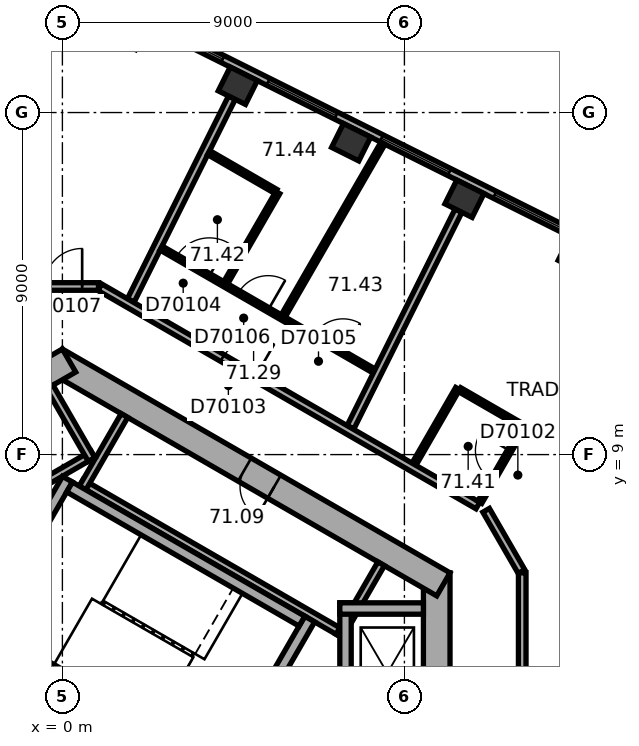
"""IFC4 building model, lengths in metres.
Left out: names, types, materials, properties, quantities, classifications, styles, units other than length and angle.
Written with IfcOpenShell. Run it as: python <this file> out.ifc"""

import sys

from ifc_helpers import new_model, si_unit, direction, frame, frame_2d, origin, origin_2d, place, context, subcontext, project, spatial, rectangle, extrude, element, fill, save


model = new_model("IFC4")
c1 = context("Model", 3, precision=1e-05, world=origin(), true_north=direction((0.0, 1.0)))
c2 = subcontext(c1, "Body", "Model", "MODEL_VIEW")
j1 = project(units=[si_unit("LENGTHUNIT", "METRE"), si_unit("PLANEANGLEUNIT", "RADIAN")], contexts=[c1])
p1 = place(None, origin())
s1 = spatial("IfcSite", under=j1, at=p1, CompositionType="ELEMENT")
p2 = place(p1, origin())
s2 = spatial("IfcBuilding", under=s1, at=p2, CompositionType="ELEMENT")
p3 = place(p2, frame((0.0, 0.0, 289.4)))
s3 = spatial("IfcBuildingStorey", under=s2, at=p3, CompositionType="ELEMENT", Elevation=289.4)
for number, where, z_axis, x_axis in (
    (1, (13.561, 14.246, 0.0), (0.0, 0.0, 1.0), (-0.895, 0.446, 0.0)),
    (2, (10.58, 15.732, 0.0), (0.0, 0.0, 1.0), (-0.895, 0.446, 0.0)),
    (3, (7.598, 17.219, 0.0), (0.0, 0.0, 1.0), (-0.895, 0.446, 0.0)),
    (4, (4.616, 18.706, 0.0), (0.0, 0.0, 1.0), (-0.895, 0.446, 0.0)),
):
    element("IfcColumn", number, at=place(p3, frame(where, z_axis=z_axis, x_axis=x_axis)), inside=s3, PredefinedType="COLUMN", context=c2, shape_type="SweptSolid", body=[
        extrude(rectangle(XDim=0.8, YDim=0.7, at=origin_2d()), origin(), (0.0, 0.0, 1.0), 3.7),
    ])
p4 = place(p3, frame((9.85, -5.889, 0.0), z_axis=(0.0, 0.0, 1.0), x_axis=(0.0, 1.0, 0.0)))
e5 = element("IfcWall", 5, at=p4, inside=s3, PredefinedType="SHEAR", context=c2, shape_type="SweptSolid", body=[
    extrude(rectangle(XDim=11.778, YDim=0.7, at=frame_2d((5.889, 0.0))), origin(), (0.0, 0.0, 1.0), 3.7),
])
p5 = place(p4, frame((6.089, 0.0, 0.0)))
e6 = element("IfcOpeningElement", 6, at=p5, cuts=e5, PredefinedType="OPENING", context=c2, shape_type="SweptSolid", body=[
    extrude(rectangle(XDim=1.5, YDim=2.1, at=frame_2d((0.75, 1.05))), frame((0.0, 0.36, 0.0), z_axis=(0.0, -1.0, 0.0), x_axis=(1.0, 0.0, 0.0)), (0.0, 0.0, 1.0), 0.72),
])
p6 = place(p4, frame((2.939, 0.0, 0.0)))
e7 = element("IfcOpeningElement", 7, at=p6, cuts=e5, PredefinedType="OPENING", context=c2, shape_type="SweptSolid", body=[
    extrude(rectangle(XDim=0.9, YDim=2.1, at=frame_2d((0.45, 1.05))), frame((0.0, 0.36, 0.0), z_axis=(0.0, -1.0, 0.0), x_axis=(1.0, 0.0, 0.0)), (0.0, 0.0, 1.0), 0.72),
])
p7 = place(p3, frame((10.025, 5.586, 0.0), z_axis=(0.0, 0.0, 1.0), x_axis=(-0.866026453023, 0.499998182661, 0.0)))
e8 = element("IfcWall", 8, at=p7, inside=s3, PredefinedType="SHEAR", context=c2, shape_type="SweptSolid", body=[
    extrude(rectangle(XDim=11.778, YDim=0.7, at=frame_2d((5.889, 0.0))), origin(), (0.0, 0.0, 1.0), 3.7),
])
p8 = place(p7, frame((5.139, 0.0, 0.0)))
e9 = element("IfcOpeningElement", 9, at=p8, cuts=e8, PredefinedType="OPENING", context=c2, shape_type="SweptSolid", body=[
    extrude(rectangle(XDim=0.9, YDim=2.1, at=frame_2d((0.45, 1.05))), frame((0.0, 0.36, 0.0), z_axis=(0.0, -1.0, 0.0), x_axis=(1.0, 0.0, 0.0)), (0.0, 0.0, 1.0), 0.72),
])
p9 = place(p3, frame((0.175, 11.475, 0.0), z_axis=(0.0, 0.0, 1.0), x_axis=(-0.866026453023, -0.499998182661, 0.0)))
e10 = element("IfcWall", 10, at=p9, inside=s3, PredefinedType="SHEAR", context=c2, shape_type="SweptSolid", body=[
    extrude(rectangle(XDim=11.778, YDim=0.7, at=frame_2d((5.889, 0.0))), origin(), (0.0, 0.0, 1.0), 3.7),
])
p10 = place(p9, frame((6.089, 0.0, 0.0)))
e11 = element("IfcOpeningElement", 11, at=p10, cuts=e10, PredefinedType="OPENING", context=c2, shape_type="SweptSolid", body=[
    extrude(rectangle(XDim=1.5, YDim=2.1, at=frame_2d((0.75, 1.05))), frame((0.0, 0.36, 0.0), z_axis=(0.0, -1.0, 0.0), x_axis=(1.0, 0.0, 0.0)), (0.0, 0.0, 1.0), 0.72),
])
p11 = place(p9, frame((2.939, 0.0, 0.0)))
e12 = element("IfcOpeningElement", 12, at=p11, cuts=e10, PredefinedType="OPENING", context=c2, shape_type="SweptSolid", body=[
    extrude(rectangle(XDim=0.9, YDim=2.1, at=frame_2d((0.45, 1.05))), frame((0.0, 0.36, 0.0), z_axis=(0.0, -1.0, 0.0), x_axis=(1.0, 0.0, 0.0)), (0.0, 0.0, 1.0), 0.72),
])
p12 = place(p3, frame((17.223, 12.923, 0.0), z_axis=(0.0, 0.0, 1.0), x_axis=(-0.894930561148, 0.44620543556, 0.0)))
e13 = element("IfcWall", 13, at=p12, inside=s3, PredefinedType="STANDARD", context=c2, shape_type="SweptSolid", body=[
    extrude(rectangle(XDim=17.731, YDim=0.2, at=frame_2d((8.866, 0.0))), origin(), (0.0, 0.0, 1.0), 3.7),
])
p13 = place(p12, frame((1.202, 0.0, 0.9)))
e14 = element("IfcOpeningElement", 14, at=p13, cuts=e13, PredefinedType="OPENING", context=c2, shape_type="SweptSolid", body=[
    extrude(rectangle(XDim=2.0, YDim=2.0, at=frame_2d((1.0, 1.0))), frame((0.0, 0.11, 0.0), z_axis=(0.0, -1.0, 0.0), x_axis=(1.0, 0.0, 0.0)), (0.0, 0.0, 1.0), 0.22),
])
p14 = place(p12, frame((4.533, 0.0, 0.9)))
e15 = element("IfcOpeningElement", 15, at=p14, cuts=e13, PredefinedType="OPENING", context=c2, shape_type="SweptSolid", body=[
    extrude(rectangle(XDim=2.0, YDim=2.0, at=frame_2d((1.0, 1.0))), frame((0.0, 0.11, 0.0), z_axis=(0.0, -1.0, 0.0), x_axis=(1.0, 0.0, 0.0)), (0.0, 0.0, 1.0), 0.22),
])
p15 = place(p12, frame((7.865, 0.0, 0.9)))
e16 = element("IfcOpeningElement", 16, at=p15, cuts=e13, PredefinedType="OPENING", context=c2, shape_type="SweptSolid", body=[
    extrude(rectangle(XDim=2.0, YDim=2.0, at=frame_2d((1.0, 1.0))), frame((0.0, 0.11, 0.0), z_axis=(0.0, -1.0, 0.0), x_axis=(1.0, 0.0, 0.0)), (0.0, 0.0, 1.0), 0.22),
])
p16 = place(p12, frame((11.197, 0.0, 0.9)))
e17 = element("IfcOpeningElement", 17, at=p16, cuts=e13, PredefinedType="OPENING", context=c2, shape_type="SweptSolid", body=[
    extrude(rectangle(XDim=2.0, YDim=2.0, at=frame_2d((1.0, 1.0))), frame((0.0, 0.11, 0.0), z_axis=(0.0, -1.0, 0.0), x_axis=(1.0, 0.0, 0.0)), (0.0, 0.0, 1.0), 0.22),
])
p17 = place(p12, frame((14.528, 0.0, 0.9)))
e18 = element("IfcOpeningElement", 18, at=p17, cuts=e13, PredefinedType="OPENING", context=c2, shape_type="SweptSolid", body=[
    extrude(rectangle(XDim=2.0, YDim=2.0, at=frame_2d((1.0, 1.0))), frame((0.0, 0.11, 0.0), z_axis=(0.0, -1.0, 0.0), x_axis=(1.0, 0.0, 0.0)), (0.0, 0.0, 1.0), 0.22),
])
p18 = place(p3, frame((7.424, 4.259, 0.0), z_axis=(0.0, 0.0, 1.0), x_axis=(-0.866026010844, 0.49999894854, 0.0)))
e19 = element("IfcWall", 19, at=p18, inside=s3, PredefinedType="PARTITIONING", context=c2, shape_type="SweptSolid", body=[
    extrude(rectangle(XDim=8.0, YDim=0.2, at=frame_2d((4.0, 0.0))), origin(), (0.0, 0.0, 1.0), 3.42),
])
for number, where, z_axis, x_axis in (
    (20, (7.287, 4.222, 0.0), (0.0, 0.0, 1.0), (0.5, 0.866, 0.0)),
    (21, (0.532, 8.122, 0.0), (0.0, 0.0, 1.0), (0.5, 0.866, 0.0)),
):
    element("IfcWall", number, at=place(p3, frame(where, z_axis=z_axis, x_axis=x_axis)), inside=s3, PredefinedType="PARTITIONING", context=c2, shape_type="SweptSolid", body=[
        extrude(rectangle(XDim=2.2, YDim=0.2, at=frame_2d((1.1, 0.0))), origin(), (0.0, 0.0, 1.0), 3.42),
    ])
p19 = place(p3, frame((0.803, 9.009, 0.0), z_axis=(0.0, 0.0, 1.0), x_axis=(-0.866028230842, -0.499995103361, 0.0)))
e22 = element("IfcWall", 22, at=p19, inside=s3, PredefinedType="PARTITIONING", context=c2, shape_type="SweptSolid", body=[
    extrude(rectangle(XDim=5.4, YDim=0.2, at=frame_2d((2.7, 0.0))), origin(), (0.0, 0.0, 1.0), 3.42),
])
p20 = place(p3, frame((0.767, 8.872, 0.0), z_axis=(0.0, 0.0, 1.0), x_axis=(-0.499994660107, 0.866028486751, 0.0)))
e23 = element("IfcWall", 23, at=p20, inside=s3, PredefinedType="PARTITIONING", context=c2, shape_type="SweptSolid", body=[
    extrude(rectangle(XDim=2.2, YDim=0.2, at=frame_2d((1.1, 0.0))), origin(), (0.0, 0.0, 1.0), 3.42),
])
p21 = place(p3, frame((4.158, 0.602, 0.0), z_axis=(0.0, 0.0, 1.0), x_axis=(0.499977259774, 0.866038532462, 0.0)))
e24 = element("IfcWall", 24, at=p21, inside=s3, PredefinedType="SHEAR", context=c2, shape_type="SweptSolid", body=[
    extrude(rectangle(XDim=4.7, YDim=0.3, at=frame_2d((2.35, 0.0))), origin(), (0.0, 0.0, 1.0), 3.42),
])
p22 = place(p21, frame((0.8, 0.0, 0.0)))
e25 = element("IfcOpeningElement", 25, at=p22, cuts=e24, PredefinedType="OPENING", context=c2, shape_type="SweptSolid", body=[
    extrude(rectangle(XDim=1.2, YDim=2.1, at=frame_2d((0.6, 1.05))), frame((0.0, 0.16, 0.0), z_axis=(0.0, -1.0, 0.0), x_axis=(1.0, 0.0, 0.0)), (0.0, 0.0, 1.0), 0.32),
])
p23 = place(p3, frame((-2.216, 4.282, 0.0), z_axis=(0.0, 0.0, 1.0), x_axis=(0.499977259774, 0.866038532462, 0.0)))
e26 = element("IfcWall", 26, at=p23, inside=s3, PredefinedType="SHEAR", context=c2, shape_type="SweptSolid", body=[
    extrude(rectangle(XDim=4.7, YDim=0.3, at=frame_2d((2.35, 0.0))), origin(), (0.0, 0.0, 1.0), 3.42),
])
for number, where, z_axis, x_axis in (
    (27, (4.103, 0.807, 0.0), (0.0, 0.0, 1.0), (-0.866, 0.5, 0.0)),
    (28, (6.303, 4.617, 0.0), (0.0, 0.0, 1.0), (-0.866, 0.5, 0.0)),
):
    element("IfcWall", number, at=place(p3, frame(where, z_axis=z_axis, x_axis=x_axis)), inside=s3, PredefinedType="SHEAR", context=c2, shape_type="SweptSolid", body=[
        extrude(rectangle(XDim=7.06, YDim=0.3, at=frame_2d((3.53, 0.0))), origin(), (0.0, 0.0, 1.0), 3.42),
    ])
p24 = place(p3, frame((7.45, 1.75, 0.0), z_axis=(0.0, 0.0, 1.0), x_axis=(0.0, 1.0, 0.0)))
e29 = element("IfcWall", 29, at=p24, inside=s3, PredefinedType="SHEAR", context=c2, shape_type="SweptSolid", body=[
    extrude(rectangle(XDim=3.35, YDim=0.3, at=frame_2d((1.675, 0.0))), origin(), (0.0, 0.0, 1.0), 3.42),
])
p25 = place(p3, frame((7.3, 4.95, 0.0), z_axis=(0.0, 0.0, 1.0), x_axis=(1.0, 0.0, 0.0)))
e30 = element("IfcWall", 30, at=p25, inside=s3, PredefinedType="SHEAR", context=c2, shape_type="SweptSolid", body=[
    extrude(rectangle(XDim=2.2, YDim=0.3, at=frame_2d((1.1, 0.0))), origin(), (0.0, 0.0, 1.0), 3.42),
])
p26 = place(p3, frame((0.95, 13.423, 0.0), z_axis=(0.0, 0.0, 1.0), x_axis=(-1.0, 0.0, 0.0)))
e31 = element("IfcWall", 31, at=p26, inside=s3, PredefinedType="PARTITIONING", context=c2, shape_type="SweptSolid", body=[
    extrude(rectangle(XDim=1.86, YDim=0.2, at=frame_2d((0.93, 0.0))), origin(), (0.0, 0.0, 1.0), 3.42),
])
p27 = place(p26, frame((0.43, 0.0, 0.0)))
e32 = element("IfcOpeningElement", 32, at=p27, cuts=e31, PredefinedType="OPENING", context=c2, shape_type="SweptSolid", body=[
    extrude(rectangle(XDim=1.0, YDim=2.1, at=frame_2d((0.5, 1.05))), frame((0.0, 0.11, 0.0), z_axis=(0.0, -1.0, 0.0), x_axis=(1.0, 0.0, 0.0)), (0.0, 0.0, 1.0), 0.22),
])
p28 = place(p3, frame((4.299, 13.522, 0.0), z_axis=(0.0, 0.0, 1.0), x_axis=(0.499982138324, 0.866035715982, 0.0)))
e33 = element("IfcWall", 33, at=p28, inside=s3, PredefinedType="PARTITIONING", context=c2, shape_type="SweptSolid", body=[
    extrude(rectangle(XDim=2.74, YDim=0.12, at=frame_2d((1.37, 0.0))), origin(), (0.0, 0.0, 1.0), 3.42),
])
p29 = place(p3, frame((4.46, 18.392, 0.0), z_axis=(0.0, 0.0, 1.0), x_axis=(-0.446197360024, -0.894934587502, 0.0)))
e34 = element("IfcWall", 34, at=p29, inside=s3, PredefinedType="PARTITIONING", context=c2, shape_type="SweptSolid", body=[
    extrude(rectangle(XDim=5.96, YDim=0.2, at=frame_2d((2.98, 0.0))), origin(), (0.0, 0.0, 1.0), 2.87),
])
p30 = place(p3, frame((5.617, 15.925, 0.0), z_axis=(0.0, 0.0, 1.0), x_axis=(-0.866010195725, 0.500026340207, 0.0)))
e35 = element("IfcWall", 35, at=p30, inside=s3, PredefinedType="PARTITIONING", context=c2, shape_type="SweptSolid", body=[
    extrude(rectangle(XDim=2.04, YDim=0.12, at=frame_2d((1.02, 0.0))), origin(), (0.0, 0.0, 1.0), 3.42),
])
p31 = place(p3, frame((8.207, 11.197, 0.0), z_axis=(0.0, 0.0, 1.0), x_axis=(-0.866030514021, 0.499991148707, 0.0)))
e36 = element("IfcWall", 36, at=p31, inside=s3, PredefinedType="PARTITIONING", context=c2, shape_type="SweptSolid", body=[
    extrude(rectangle(XDim=6.476, YDim=0.12, at=frame_2d((3.238, 0.0))), origin(), (0.0, 0.0, 1.0), 3.42),
])
p32 = place(p31, frame((5.011, 0.0, 0.0)))
e37 = element("IfcOpeningElement", 37, at=p32, cuts=e36, PredefinedType="OPENING", context=c2, shape_type="SweptSolid", body=[
    extrude(rectangle(XDim=1.0, YDim=2.1, at=frame_2d((0.5, 1.05))), frame((0.0, 0.07, 0.0), z_axis=(0.0, -1.0, 0.0), x_axis=(1.0, 0.0, 0.0)), (0.0, 0.0, 1.0), 0.14),
])
p33 = place(p31, frame((0.95, 0.0, 0.0)))
e38 = element("IfcOpeningElement", 38, at=p33, cuts=e36, PredefinedType="OPENING", context=c2, shape_type="SweptSolid", body=[
    extrude(rectangle(XDim=0.9, YDim=2.1, at=frame_2d((0.45, 1.05))), frame((0.0, 0.07, 0.0), z_axis=(0.0, -1.0, 0.0), x_axis=(1.0, 0.0, 0.0)), (0.0, 0.0, 1.0), 0.14),
])
p34 = place(p31, frame((3.223, 0.0, 0.0)))
e39 = element("IfcOpeningElement", 39, at=p34, cuts=e36, PredefinedType="OPENING", context=c2, shape_type="SweptSolid", body=[
    extrude(rectangle(XDim=0.9, YDim=2.1, at=frame_2d((0.45, 1.05))), frame((0.0, 0.07, 0.0), z_axis=(0.0, -1.0, 0.0), x_axis=(1.0, 0.0, 0.0)), (0.0, 0.0, 1.0), 0.14),
])
p35 = place(p3, frame((8.435, 17.192, 0.0), z_axis=(0.0, 0.0, 1.0), x_axis=(-0.499982949935, -0.86603524742, 0.0)))
e40 = element("IfcWall", 40, at=p35, inside=s3, PredefinedType="PARTITIONING", context=c2, shape_type="SweptSolid", body=[
    extrude(rectangle(XDim=5.246, YDim=0.12, at=frame_2d((2.623, 0.0))), origin(), (0.0, 0.0, 1.0), 3.42),
])
p36 = place(p3, frame((9.251, 8.746, 0.0), z_axis=(0.0, 0.0, 1.0), x_axis=(0.499998129301, 0.86602648383, 0.0)))
e41 = element("IfcWall", 41, at=p36, inside=s3, PredefinedType="PARTITIONING", context=c2, shape_type="SweptSolid", body=[
    extrude(rectangle(XDim=2.3, YDim=0.12, at=frame_2d((1.15, 0.0))), origin(), (0.0, 0.0, 1.0), 3.42),
])
p37 = place(p3, frame((10.423, 15.419, 0.0), z_axis=(0.0, 0.0, 1.0), x_axis=(-0.446201045829, -0.89493274982, 0.0)))
e42 = element("IfcWall", 42, at=p37, inside=s3, PredefinedType="PARTITIONING", context=c2, shape_type="SweptSolid", body=[
    extrude(rectangle(XDim=6.367, YDim=0.2, at=frame_2d((3.184, 0.0))), origin(), (0.0, 0.0, 1.0), 2.87),
])
p38 = place(p3, frame((10.453, 10.708, 0.0), z_axis=(0.0, 0.0, 1.0), x_axis=(0.865988597889, -0.500063744262, 0.0)))
e43 = element("IfcWall", 43, at=p38, inside=s3, PredefinedType="PARTITIONING", context=c2, shape_type="SweptSolid", body=[
    extrude(rectangle(XDim=1.94, YDim=0.12, at=frame_2d((0.97, 0.0))), origin(), (0.0, 0.0, 1.0), 3.42),
])
p39 = place(p3, frame((10.934, 7.659, 0.0), z_axis=(0.0, 0.0, 1.0), x_axis=(-0.866030932647, 0.499990423607, 0.0)))
e44 = element("IfcWall", 44, at=p39, inside=s3, PredefinedType="PARTITIONING", context=c2, shape_type="SweptSolid", body=[
    extrude(rectangle(XDim=11.488, YDim=0.2, at=frame_2d((5.744, 0.0))), origin(), (0.0, 0.0, 1.0), 3.42),
])
p40 = place(p39, frame((6.764, 0.0, 0.0)))
e45 = element("IfcOpeningElement", 45, at=p40, cuts=e44, PredefinedType="OPENING", context=c2, shape_type="SweptSolid", body=[
    extrude(rectangle(XDim=1.0, YDim=2.1, at=frame_2d((0.5, 1.05))), frame((0.0, 0.11, 0.0), z_axis=(0.0, -1.0, 0.0), x_axis=(1.0, 0.0, 0.0)), (0.0, 0.0, 1.0), 0.22),
])
p41 = place(p3, frame((12.08, 5.924, 0.0), z_axis=(0.0, 0.0, 1.0), x_axis=(-0.500063286585, 0.865988862174, 0.0)))
e46 = element("IfcWall", 46, at=p41, inside=s3, PredefinedType="PARTITIONING", context=c2, shape_type="SweptSolid", body=[
    extrude(rectangle(XDim=1.86, YDim=0.2, at=frame_2d((0.93, 0.0))), origin(), (0.0, 0.0, 1.0), 3.42),
])
p42 = place(p3, frame((12.1, 2.448, 0.0), z_axis=(0.0, 0.0, 1.0), x_axis=(0.0, 1.0, 0.0)))
e47 = element("IfcWall", 47, at=p42, inside=s3, PredefinedType="PARTITIONING", context=c2, shape_type="SweptSolid", body=[
    extrude(rectangle(XDim=3.441, YDim=0.2, at=frame_2d((1.72, 0.0))), origin(), (0.0, 0.0, 1.0), 3.42),
])
p43 = place(p3, frame((12.104, 9.686, 0.0), z_axis=(0.0, 0.0, 1.0), x_axis=(-0.500077830873, -0.865980463445, 0.0)))
e48 = element("IfcWall", 48, at=p43, inside=s3, PredefinedType="PARTITIONING", context=c2, shape_type="SweptSolid", body=[
    extrude(rectangle(XDim=2.24, YDim=0.12, at=frame_2d((1.12, 0.0))), origin(), (0.0, 0.0, 1.0), 3.42),
])
p44 = place(p43, frame((0.67, 0.0, 0.0)))
e49 = element("IfcOpeningElement", 49, at=p44, cuts=e48, PredefinedType="OPENING", context=c2, shape_type="SweptSolid", body=[
    extrude(rectangle(XDim=0.9, YDim=2.1, at=frame_2d((0.45, 1.05))), frame((0.0, 0.07, 0.0), z_axis=(0.0, -1.0, 0.0), x_axis=(1.0, 0.0, 0.0)), (0.0, 0.0, 1.0), 0.14),
])
p45 = place(p14, origin())
e50 = element("IfcWindow", 50, at=p45, inside=s3, PartitioningType="SINGLE_PANEL", PredefinedType="WINDOW", context=c2, shape_type="SweptSolid", body=[
    extrude(rectangle(XDim=2.0, YDim=2.0, at=frame_2d((1.0, 1.0))), frame((0.0, 0.03, 0.0), z_axis=(0.0, -1.0, 0.0), x_axis=(1.0, 0.0, 0.0)), (0.0, 0.0, 1.0), 0.06),
])
fill(e15, e50)
p46 = place(p15, origin())
e51 = element("IfcWindow", 51, at=p46, inside=s3, PartitioningType="SINGLE_PANEL", PredefinedType="WINDOW", context=c2, shape_type="SweptSolid", body=[
    extrude(rectangle(XDim=2.0, YDim=2.0, at=frame_2d((1.0, 1.0))), frame((0.0, 0.03, 0.0), z_axis=(0.0, -1.0, 0.0), x_axis=(1.0, 0.0, 0.0)), (0.0, 0.0, 1.0), 0.06),
])
fill(e16, e51)
p47 = place(p16, origin())
e52 = element("IfcWindow", 52, at=p47, inside=s3, PartitioningType="SINGLE_PANEL", PredefinedType="WINDOW", context=c2, shape_type="SweptSolid", body=[
    extrude(rectangle(XDim=2.0, YDim=2.0, at=frame_2d((1.0, 1.0))), frame((0.0, 0.03, 0.0), z_axis=(0.0, -1.0, 0.0), x_axis=(1.0, 0.0, 0.0)), (0.0, 0.0, 1.0), 0.06),
])
fill(e17, e52)
p48 = place(p17, origin())
e53 = element("IfcWindow", 53, at=p48, inside=s3, PartitioningType="SINGLE_PANEL", PredefinedType="WINDOW", context=c2, shape_type="SweptSolid", body=[
    extrude(rectangle(XDim=2.0, YDim=2.0, at=frame_2d((1.0, 1.0))), frame((0.0, 0.03, 0.0), z_axis=(0.0, -1.0, 0.0), x_axis=(1.0, 0.0, 0.0)), (0.0, 0.0, 1.0), 0.06),
])
fill(e18, e53)
p49 = place(p8, origin())
e54 = element("IfcDoor", 54, at=p49, inside=s3, OperationType="SINGLE_SWING_LEFT", PredefinedType="DOOR", context=c2, shape_type="SweptSolid", body=[
    extrude(rectangle(XDim=0.9, YDim=2.1, at=frame_2d((0.45, 1.05))), frame((0.0, 0.025, 0.0), z_axis=(0.0, -1.0, 0.0), x_axis=(1.0, 0.0, 0.0)), (0.0, 0.0, 1.0), 0.05),
])
fill(e9, e54)
p50 = place(p44, origin())
e55 = element("IfcDoor", 55, at=p50, inside=s3, OperationType="SINGLE_SWING_LEFT", PredefinedType="DOOR", context=c2, shape_type="SweptSolid", body=[
    extrude(rectangle(XDim=0.9, YDim=2.1, at=frame_2d((0.45, 1.05))), frame((0.0, 0.025, 0.0), z_axis=(0.0, -1.0, 0.0), x_axis=(1.0, 0.0, 0.0)), (0.0, 0.0, 1.0), 0.05),
])
fill(e49, e55)
p51 = place(p40, origin())
e56 = element("IfcDoor", 56, at=p51, inside=s3, OperationType="SINGLE_SWING_LEFT", PredefinedType="DOOR", context=c2, shape_type="SweptSolid", body=[
    extrude(rectangle(XDim=1.0, YDim=2.1, at=frame_2d((0.5, 1.05))), frame((0.0, 0.025, 0.0), z_axis=(0.0, -1.0, 0.0), x_axis=(1.0, 0.0, 0.0)), (0.0, 0.0, 1.0), 0.05),
])
fill(e45, e56)
p52 = place(p32, origin())
e57 = element("IfcDoor", 57, at=p52, inside=s3, OperationType="SINGLE_SWING_LEFT", PredefinedType="DOOR", context=c2, shape_type="SweptSolid", body=[
    extrude(rectangle(XDim=1.0, YDim=2.1, at=frame_2d((0.5, 1.05))), frame((0.0, 0.025, 0.0), z_axis=(0.0, -1.0, 0.0), x_axis=(1.0, 0.0, 0.0)), (0.0, 0.0, 1.0), 0.05),
])
fill(e37, e57)
p53 = place(p33, origin())
e58 = element("IfcDoor", 58, at=p53, inside=s3, OperationType="SINGLE_SWING_LEFT", PredefinedType="DOOR", context=c2, shape_type="SweptSolid", body=[
    extrude(rectangle(XDim=0.9, YDim=2.1, at=frame_2d((0.45, 1.05))), frame((0.0, 0.025, 0.0), z_axis=(0.0, -1.0, 0.0), x_axis=(1.0, 0.0, 0.0)), (0.0, 0.0, 1.0), 0.05),
])
fill(e38, e58)
p54 = place(p34, origin())
e59 = element("IfcDoor", 59, at=p54, inside=s3, OperationType="SINGLE_SWING_LEFT", PredefinedType="DOOR", context=c2, shape_type="SweptSolid", body=[
    extrude(rectangle(XDim=0.9, YDim=2.1, at=frame_2d((0.45, 1.05))), frame((0.0, 0.025, 0.0), z_axis=(0.0, -1.0, 0.0), x_axis=(1.0, 0.0, 0.0)), (0.0, 0.0, 1.0), 0.05),
])
fill(e39, e59)
p55 = place(p27, origin())
e60 = element("IfcDoor", 60, at=p55, inside=s3, OperationType="SINGLE_SWING_LEFT", PredefinedType="DOOR", context=c2, shape_type="SweptSolid", body=[
    extrude(rectangle(XDim=1.0, YDim=2.1, at=frame_2d((0.5, 1.05))), frame((0.0, 0.025, 0.0), z_axis=(0.0, -1.0, 0.0), x_axis=(1.0, 0.0, 0.0)), (0.0, 0.0, 1.0), 0.05),
])
fill(e32, e60)
save(model, sys.argv[1])
